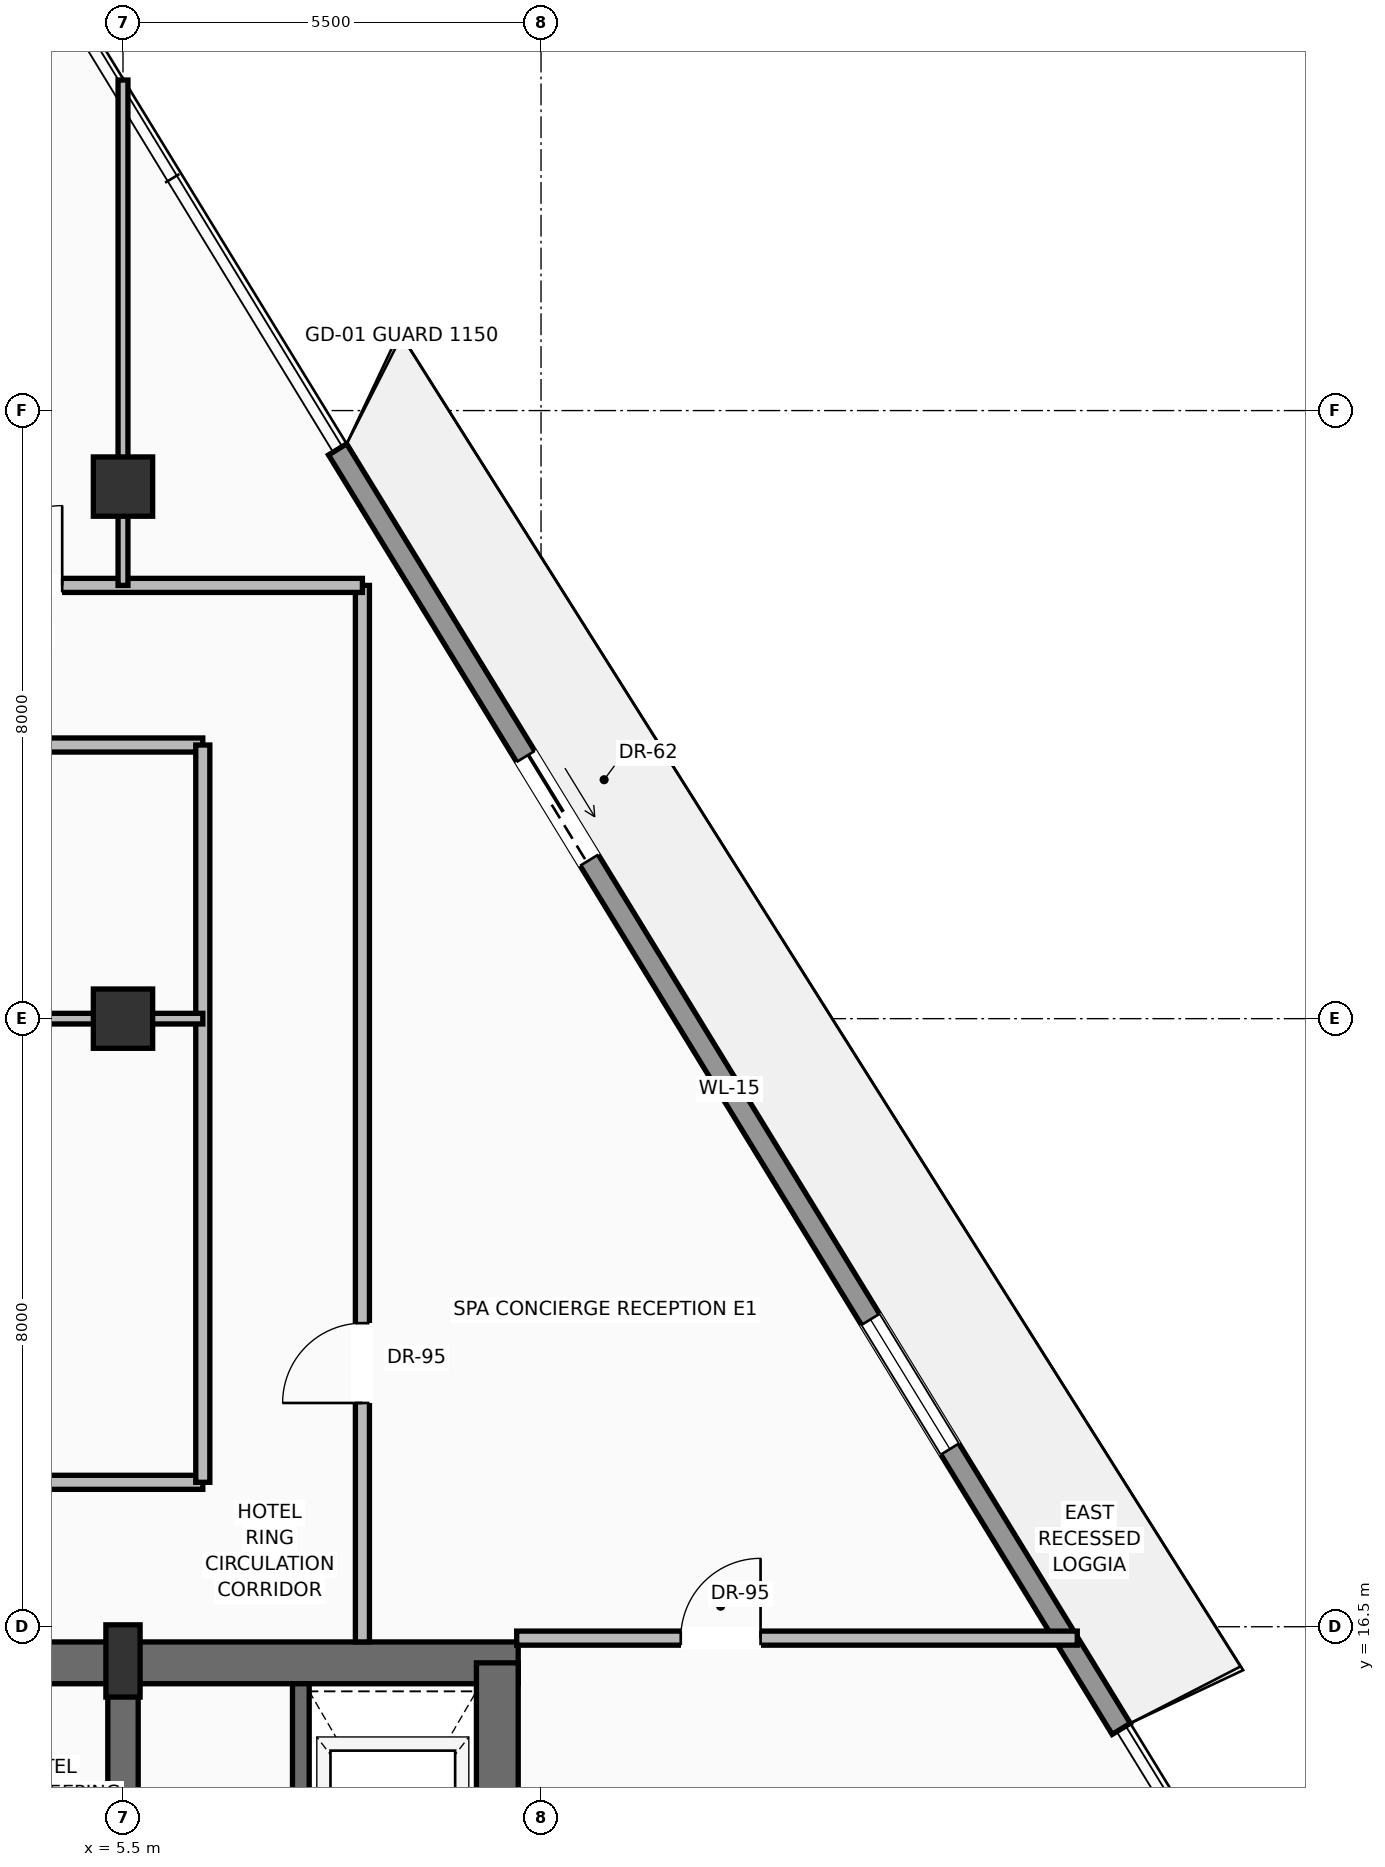
"""IFC4 building model, lengths in metres.
Left out: names, types, materials, properties, quantities, classifications, styles, units other than length and angle.
Written with IfcOpenShell. Run it as: python <this file> out.ifc"""

import sys

from ifc_helpers import new_model, si_unit, direction, frame, frame_2d, origin, origin_2d, place, context, subcontext, project, spatial, rectangle, extrude, source, transform, mapped, element, fill, save


model = new_model("IFC4")
c1 = context("Model", 3, precision=1e-05, world=origin(), true_north=direction((0.0, 1.0)))
c2 = subcontext(c1, "Body", "Model", "MODEL_VIEW")
j1 = project(units=[si_unit("LENGTHUNIT", "METRE"), si_unit("PLANEANGLEUNIT", "RADIAN")], contexts=[c1])
p1 = place(None, origin())
s1 = spatial("IfcSite", under=j1, at=p1, CompositionType="ELEMENT")
p2 = place(p1, origin())
s2 = spatial("IfcBuilding", under=s1, at=p2, CompositionType="ELEMENT")
p3 = place(p2, frame((0.0, 0.0, 247.6)))
s3 = spatial("IfcBuildingStorey", under=s2, at=p3, CompositionType="ELEMENT", Elevation=247.6)
p4 = place(p3, frame((-10.7, 16.025, 0.0), z_axis=(0.0, 0.0, 1.0), x_axis=(1.0, 0.0, 0.0)))
e1 = element("IfcWall", 1, at=p4, inside=s3, PredefinedType="SHEAR", context=c2, shape_type="SweptSolid", body=[
    extrude(rectangle(XDim=21.4, YDim=0.55, at=frame_2d((10.7, 0.0))), origin(), (0.0, 0.0, 1.0), 3.24),
])
p5 = place(p4, frame((3.27, 0.0, 0.0)))
e2 = element("IfcOpeningElement", 2, at=p5, cuts=e1, PredefinedType="OPENING", context=c2, shape_type="SweptSolid", body=[
    extrude(rectangle(XDim=1.3, YDim=2.3, at=frame_2d((0.65, 1.15))), frame((0.0, 0.285, 0.0), z_axis=(0.0, -1.0, 0.0), x_axis=(1.0, 0.0, 0.0)), (0.0, 0.0, 1.0), 0.57),
])
p6 = place(p4, frame((9.7, 0.0, 0.0)))
e3 = element("IfcOpeningElement", 3, at=p6, cuts=e1, PredefinedType="OPENING", context=c2, shape_type="SweptSolid", body=[
    extrude(rectangle(XDim=2.0, YDim=2.4, at=frame_2d((1.0, 1.2))), frame((0.0, 0.285, 0.0), z_axis=(0.0, -1.0, 0.0), x_axis=(1.0, 0.0, 0.0)), (0.0, 0.0, 1.0), 0.57),
])
p7 = place(p3, frame((10.425, 0.575, 0.0), z_axis=(0.0, 0.0, 1.0), x_axis=(0.0, 1.0, 0.0)))
e4 = element("IfcWall", 4, at=p7, inside=s3, PredefinedType="SHEAR", context=c2, shape_type="SweptSolid", body=[
    extrude(rectangle(XDim=15.45, YDim=0.55, at=frame_2d((7.725, 0.0))), origin(), (0.0, 0.0, 1.0), 3.24),
])
p8 = place(p3, frame((5.5, 0.575, 0.0), z_axis=(0.0, 0.0, 1.0), x_axis=(0.0, 1.0, 0.0)))
e5 = element("IfcWall", 5, at=p8, inside=s3, PredefinedType="SHEAR", context=c2, shape_type="SweptSolid", body=[
    extrude(rectangle(XDim=15.45, YDim=0.4, at=frame_2d((7.725, 0.0))), origin(), (0.0, 0.0, 1.0), 3.24),
])
p9 = place(p8, frame((8.925, 0.0, 0.0)))
e6 = element("IfcOpeningElement", 6, at=p9, cuts=e5, PredefinedType="OPENING", context=c2, shape_type="SweptSolid", body=[
    extrude(rectangle(XDim=1.1, YDim=2.2, at=frame_2d((0.55, 1.1))), frame((0.0, 0.21, 0.0), z_axis=(0.0, -1.0, 0.0), x_axis=(1.0, 0.0, 0.0)), (0.0, 0.0, 1.0), 0.42),
])
m1 = source(origin(), c2, "Body", "SweptSolid", [
    extrude(rectangle(XDim=0.45, YDim=0.95, at=origin_2d()), origin(), (0.0, 0.0, 1.0), 3.45),
])
p10 = place(p3, frame((5.5, 16.05, 0.0), z_axis=(0.0, 0.0, 1.0), x_axis=(1.0, 0.0, 0.0)))
e7 = element("IfcColumn", 7, at=p10, inside=s3, PredefinedType="PILASTER", context=c2, shape_type="MappedRepresentation", body=[
    mapped(m1, transform((0.0, 0.0, 0.0), scale=1.0)),
])
m2 = source(origin(), c2, "Body", "SweptSolid", [
    extrude(rectangle(XDim=0.78, YDim=0.78, at=origin_2d()), origin(), (0.0, 0.0, 1.0), 3.45),
])
for number, where, z_axis, x_axis in (
    (8, (5.5, 24.5, 0.0), (0.0, 0.0, 1.0), (1.0, 0.0, 0.0)),
    (9, (5.5, 31.5, 0.0), (0.0, 0.0, 1.0), (1.0, 0.0, 0.0)),
):
    element("IfcColumn", number, at=place(p3, frame(where, z_axis=z_axis, x_axis=x_axis)), inside=s3, PredefinedType="COLUMN", context=c2, shape_type="MappedRepresentation", body=[
        mapped(m2, transform((0.0, 0.0, 0.0), scale=1.0)),
    ])
p11 = place(p3, frame((8.324, 31.99, 0.0), z_axis=(0.0, 0.0, 1.0), x_axis=(0.522311741814, -0.852754621426, 0.0)))
e10 = element("IfcWall", 10, at=p11, inside=s3, PredefinedType="SOLIDWALL", context=c2, shape_type="SweptSolid", body=[
    extrude(rectangle(XDim=19.739, YDim=0.28, at=frame_2d((9.87, 0.0))), origin(), (0.0, 0.0, 1.0), 2.82),
])
p12 = place(p11, frame((4.737, 0.0, 0.0)))
e11 = element("IfcOpeningElement", 11, at=p12, cuts=e10, PredefinedType="OPENING", context=c2, shape_type="SweptSolid", body=[
    extrude(rectangle(XDim=1.6, YDim=2.35, at=frame_2d((0.8, 1.175))), frame((0.0, 0.15, 0.0), z_axis=(0.0, -1.0, 0.0), x_axis=(1.0, 0.0, 0.0)), (0.0, 0.0, 1.0), 0.3),
])
p13 = place(p11, frame((13.423, 0.0, 0.9)))
e12 = element("IfcOpeningElement", 12, at=p13, cuts=e10, PredefinedType="OPENING", context=c2, shape_type="SweptSolid", body=[
    extrude(rectangle(XDim=2.0, YDim=1.75, at=frame_2d((1.0, 0.875))), frame((0.0, 0.15, 0.0), z_axis=(0.0, -1.0, 0.0), x_axis=(1.0, 0.0, 0.0)), (0.0, 0.0, 1.0), 0.3),
])
p14 = place(p3, frame((7.84, 11.87, 0.0), z_axis=(0.0, 0.0, 1.0), x_axis=(0.0, 1.0, 0.0)))
e13 = element("IfcWall", 13, at=p14, inside=s3, PredefinedType="SOLIDWALL", context=c2, shape_type="SweptSolid", body=[
    extrude(rectangle(XDim=3.88, YDim=0.22, at=frame_2d((1.94, 0.0))), origin(), (0.0, 0.0, 1.0), 3.24),
])
p15 = place(p3, frame((-5.85, 18.4, 0.0), z_axis=(0.0, 0.0, 1.0), x_axis=(1.0, 0.0, 0.0)))
e14 = element("IfcWall", 14, at=p15, inside=s3, PredefinedType="PARTITIONING", context=c2, shape_type="SweptSolid", body=[
    extrude(rectangle(XDim=12.4, YDim=0.185, at=frame_2d((6.2, 0.0))), origin(), (0.0, 0.0, 1.0), 3.232),
])
p16 = place(p15, frame((5.725, 0.0, 0.0)))
e15 = element("IfcOpeningElement", 15, at=p16, cuts=e14, PredefinedType="OPENING", context=c2, shape_type="SweptSolid", body=[
    extrude(rectangle(XDim=0.95, YDim=2.2, at=frame_2d((0.475, 1.1))), frame((0.0, 0.103, 0.0), z_axis=(0.0, -1.0, 0.0), x_axis=(1.0, 0.0, 0.0)), (0.0, 0.0, 1.0), 0.205),
])
p17 = place(p3, frame((-5.85, 28.1, 0.0), z_axis=(0.0, 0.0, 1.0), x_axis=(1.0, 0.0, 0.0)))
e16 = element("IfcWall", 16, at=p17, inside=s3, PredefinedType="PARTITIONING", context=c2, shape_type="SweptSolid", body=[
    extrude(rectangle(XDim=12.4, YDim=0.185, at=frame_2d((6.2, 0.0))), origin(), (0.0, 0.0, 1.0), 2.885),
])
p18 = place(p17, frame((5.725, 0.0, 0.0)))
e17 = element("IfcOpeningElement", 17, at=p18, cuts=e16, PredefinedType="OPENING", context=c2, shape_type="SweptSolid", body=[
    extrude(rectangle(XDim=0.95, YDim=2.2, at=frame_2d((0.475, 1.1))), frame((0.0, 0.103, 0.0), z_axis=(0.0, -1.0, 0.0), x_axis=(1.0, 0.0, 0.0)), (0.0, 0.0, 1.0), 0.205),
])
p19 = place(p3, frame((6.55, 18.4, 0.0), z_axis=(0.0, 0.0, 1.0), x_axis=(0.0, 1.0, 0.0)))
e18 = element("IfcWall", 18, at=p19, inside=s3, PredefinedType="PARTITIONING", context=c2, shape_type="SweptSolid", body=[
    extrude(rectangle(XDim=9.7, YDim=0.185, at=frame_2d((4.85, 0.0))), origin(), (0.0, 0.0, 1.0), 3.232),
])
p20 = place(p3, frame((8.65, 16.3, 0.0), z_axis=(0.0, 0.0, 1.0), x_axis=(0.0, 1.0, 0.0)))
e19 = element("IfcWall", 19, at=p20, inside=s3, PredefinedType="PARTITIONING", context=c2, shape_type="SweptSolid", body=[
    extrude(rectangle(XDim=13.9, YDim=0.185, at=frame_2d((6.95, 0.0))), origin(), (0.0, 0.0, 1.0), 3.232),
])
p21 = place(p20, frame((3.144, 0.0, 0.0)))
e20 = element("IfcOpeningElement", 20, at=p21, cuts=e19, PredefinedType="OPENING", context=c2, shape_type="SweptSolid", body=[
    extrude(rectangle(XDim=1.05, YDim=2.25, at=frame_2d((0.525, 1.125))), frame((0.0, 0.103, 0.0), z_axis=(0.0, -1.0, 0.0), x_axis=(1.0, 0.0, 0.0)), (0.0, 0.0, 1.0), 0.205),
])
p22 = place(p3, frame((-7.95, 30.2, 0.0), z_axis=(0.0, 0.0, 1.0), x_axis=(1.0, 0.0, 0.0)))
e21 = element("IfcWall", 21, at=p22, inside=s3, PredefinedType="PARTITIONING", context=c2, shape_type="SweptSolid", body=[
    extrude(rectangle(XDim=16.6, YDim=0.185, at=frame_2d((8.3, 0.0))), origin(), (0.0, 0.0, 1.0), 3.232),
])
p23 = place(p22, frame((3.25, 0.0, 0.0)))
e22 = element("IfcOpeningElement", 22, at=p23, cuts=e21, PredefinedType="OPENING", context=c2, shape_type="SweptSolid", body=[
    extrude(rectangle(XDim=1.05, YDim=2.25, at=frame_2d((0.525, 1.125))), frame((0.0, 0.103, 0.0), z_axis=(0.0, -1.0, 0.0), x_axis=(1.0, 0.0, 0.0)), (0.0, 0.0, 1.0), 0.205),
])
p24 = place(p22, frame((7.775, 0.0, 0.0)))
e23 = element("IfcOpeningElement", 23, at=p24, cuts=e21, PredefinedType="OPENING", context=c2, shape_type="SweptSolid", body=[
    extrude(rectangle(XDim=1.05, YDim=2.25, at=frame_2d((0.525, 1.125))), frame((0.0, 0.103, 0.0), z_axis=(0.0, -1.0, 0.0), x_axis=(1.0, 0.0, 0.0)), (0.0, 0.0, 1.0), 0.205),
])
p25 = place(p22, frame((11.6, 0.0, 0.0)))
e24 = element("IfcOpeningElement", 24, at=p25, cuts=e21, PredefinedType="OPENING", context=c2, shape_type="SweptSolid", body=[
    extrude(rectangle(XDim=1.05, YDim=2.25, at=frame_2d((0.525, 1.125))), frame((0.0, 0.103, 0.0), z_axis=(0.0, -1.0, 0.0), x_axis=(1.0, 0.0, 0.0)), (0.0, 0.0, 1.0), 0.205),
])
p26 = place(p3, frame((-5.85, 24.5, 0.0), z_axis=(0.0, 0.0, 1.0), x_axis=(1.0, 0.0, 0.0)))
e25 = element("IfcWall", 25, at=p26, inside=s3, PredefinedType="PARTITIONING", context=c2, shape_type="SweptSolid", body=[
    extrude(rectangle(XDim=12.4, YDim=0.14, at=frame_2d((6.2, 0.0))), origin(), (0.0, 0.0, 1.0), 2.683),
])
p27 = place(p3, frame((10.68, 16.35, 0.0), z_axis=(0.0, 0.0, 1.0), x_axis=(1.0, 0.0, 0.0)))
e26 = element("IfcWall", 26, at=p27, inside=s3, PredefinedType="PARTITIONING", context=c2, shape_type="SweptSolid", body=[
    extrude(rectangle(XDim=7.375, YDim=0.185, at=frame_2d((3.688, 0.0))), origin(), (0.0, 0.0, 1.0), 3.232),
])
p28 = place(p27, frame((2.158, 0.0, 0.0)))
e27 = element("IfcOpeningElement", 27, at=p28, cuts=e26, PredefinedType="OPENING", context=c2, shape_type="SweptSolid", body=[
    extrude(rectangle(XDim=1.05, YDim=2.25, at=frame_2d((0.525, 1.125))), frame((0.0, 0.103, 0.0), z_axis=(0.0, -1.0, 0.0), x_axis=(1.0, 0.0, 0.0)), (0.0, 0.0, 1.0), 0.205),
])
p29 = place(p3, frame((5.5, 30.2, 0.0), z_axis=(0.0, 0.0, 1.0), x_axis=(0.0, 1.0, 0.0)))
e28 = element("IfcWall", 28, at=p29, inside=s3, PredefinedType="PARTITIONING", context=c2, shape_type="SweptSolid", body=[
    extrude(rectangle(XDim=6.649, YDim=0.13, at=frame_2d((3.324, 0.0))), origin(), (0.0, 0.0, 1.0), 2.683),
])
m3 = source(origin(), c2, "Body", "SweptSolid", [
    extrude(rectangle(XDim=1.6, YDim=2.35, at=frame_2d((0.8, 1.175))), frame((0.0, 0.025, 0.0), z_axis=(0.0, -1.0, 0.0), x_axis=(1.0, 0.0, 0.0)), (0.0, 0.0, 1.0), 0.05),
])
p30 = place(p12, origin())
e29 = element("IfcDoor", 29, at=p30, inside=s3, OperationType="SLIDING_TO_RIGHT", PredefinedType="DOOR", context=c2, shape_type="MappedRepresentation", body=[
    mapped(m3, transform((0.0, 0.0, 0.0), scale=1.0)),
])
fill(e11, e29)
m4 = source(origin(), c2, "Body", "SweptSolid", [
    extrude(rectangle(XDim=2.0, YDim=1.75, at=frame_2d((1.0, 0.875))), frame((0.0, 0.03, 0.0), z_axis=(0.0, -1.0, 0.0), x_axis=(1.0, 0.0, 0.0)), (0.0, 0.0, 1.0), 0.06),
])
p31 = place(p13, origin())
e30 = element("IfcWindow", 30, at=p31, inside=s3, PartitioningType="SINGLE_PANEL", PredefinedType="WINDOW", context=c2, shape_type="MappedRepresentation", body=[
    mapped(m4, transform((0.0, 0.0, 0.0), scale=1.0)),
])
fill(e12, e30)
m5 = source(origin(), c2, "Body", "SweptSolid", [
    extrude(rectangle(XDim=1.05, YDim=2.25, at=frame_2d((0.525, 1.125))), frame((0.0, 0.025, 0.0), z_axis=(0.0, -1.0, 0.0), x_axis=(1.0, 0.0, 0.0)), (0.0, 0.0, 1.0), 0.05),
])
p32 = place(p28, origin())
e31 = element("IfcDoor", 31, at=p32, inside=s3, OperationType="SINGLE_SWING_RIGHT", PredefinedType="DOOR", context=c2, shape_type="MappedRepresentation", body=[
    mapped(m5, transform((0.0, 0.0, 0.0), scale=1.0)),
])
fill(e27, e31)
p33 = place(p21, origin())
e32 = element("IfcDoor", 32, at=p33, inside=s3, OperationType="SINGLE_SWING_LEFT", PredefinedType="DOOR", context=c2, shape_type="MappedRepresentation", body=[
    mapped(m5, transform((0.0, 0.0, 0.0), scale=1.0)),
])
fill(e20, e32)
p34 = place(p25, origin())
e33 = element("IfcDoor", 33, at=p34, inside=s3, OperationType="SINGLE_SWING_RIGHT", PredefinedType="DOOR", context=c2, shape_type="MappedRepresentation", body=[
    mapped(m5, transform((0.0, 0.0, 0.0), scale=1.0)),
])
fill(e24, e33)
save(model, sys.argv[1])
